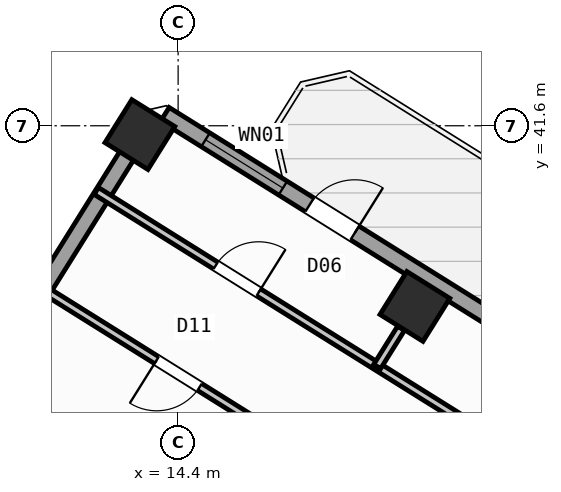
"""IFC4 building model, lengths in metres.
Left out: names, types, materials, properties, quantities, classifications, styles, units other than length and angle.
Written with IfcOpenShell. Run it as: python <this file> out.ifc"""

import sys

from ifc_helpers import new_model, si_unit, direction, frame, frame_2d, origin, origin_2d, place, context, subcontext, project, spatial, rectangle, hollow_rectangle, extrude, source, transform, mapped, element, fill, save


model = new_model("IFC4")
c1 = context("Model", 3, precision=1e-05, world=origin(), true_north=direction((0.0, 1.0)))
c2 = subcontext(c1, "Body", "Model", "MODEL_VIEW")
j1 = project(units=[si_unit("LENGTHUNIT", "METRE"), si_unit("PLANEANGLEUNIT", "RADIAN")], contexts=[c1])
p1 = place(None, origin())
s1 = spatial("IfcSite", under=j1, at=p1, CompositionType="ELEMENT")
p2 = place(p1, origin())
s2 = spatial("IfcBuilding", under=s1, at=p2, CompositionType="ELEMENT")
p3 = place(p2, frame((0.0, 0.0, 42.0)))
s3 = spatial("IfcBuildingStorey", under=s2, at=p3, CompositionType="ELEMENT", Elevation=42.0)
m1 = source(origin(), c2, "Body", "SweptSolid", [
    extrude(hollow_rectangle(XDim=1.0, YDim=1.0, WallThickness=0.04, at=origin_2d()), origin(), (0.0, 0.0, 1.0), 3.6),
])
for number, where, z_axis, x_axis in (
    (1, (19.073, 38.034, 0.0), (0.0, 0.0, 1.0), (-0.848, 0.53, 0.0)),
    (2, (13.646, 41.426, 0.0), (0.0, 0.0, 1.0), (-0.848, 0.53, 0.0)),
):
    element("IfcColumn", number, at=place(p3, frame(where, z_axis=z_axis, x_axis=x_axis)), inside=s3, PredefinedType="COLUMN", context=c2, shape_type="MappedRepresentation", body=[
        mapped(m1, transform((0.0, 0.0, 0.0), scale=1.0)),
    ])
p4 = place(p3, frame((2.415, 23.452, 0.0), z_axis=(0.0, 0.0, 1.0), x_axis=(0.52991049553, 0.848053575387, 0.0)))
e3 = element("IfcWall", 3, at=p4, inside=s3, PredefinedType="STANDARD", context=c2, shape_type="SweptSolid", body=[
    extrude(rectangle(XDim=21.587, YDim=0.32, at=frame_2d((10.794, 0.0))), origin(), (0.0, 0.0, 1.0), 2.725),
])
p5 = place(p4, frame((2.356, 0.0, 0.8)))
e4 = element("IfcOpeningElement", 4, at=p5, cuts=e3, PredefinedType="OPENING", context=c2, shape_type="SweptSolid", body=[
    extrude(rectangle(XDim=2.1, YDim=1.55, at=frame_2d((1.05, 0.775))), frame((0.0, 0.17, 0.0), z_axis=(0.0, -1.0, 0.0), x_axis=(1.0, 0.0, 0.0)), (0.0, 0.0, 1.0), 0.34),
])
p6 = place(p4, frame((9.344, 0.0, 0.85)))
e5 = element("IfcOpeningElement", 5, at=p6, cuts=e3, PredefinedType="OPENING", context=c2, shape_type="SweptSolid", body=[
    extrude(rectangle(XDim=1.8, YDim=1.5, at=frame_2d((0.9, 0.75))), frame((0.0, 0.17, 0.0), z_axis=(0.0, -1.0, 0.0), x_axis=(1.0, 0.0, 0.0)), (0.0, 0.0, 1.0), 0.34),
])
p7 = place(p4, frame((15.154, 0.0, 0.85)))
e6 = element("IfcOpeningElement", 6, at=p7, cuts=e3, PredefinedType="OPENING", context=c2, shape_type="SweptSolid", body=[
    extrude(rectangle(XDim=1.5, YDim=1.5, at=frame_2d((0.75, 0.75))), frame((0.0, 0.17, 0.0), z_axis=(0.0, -1.0, 0.0), x_axis=(1.0, 0.0, 0.0)), (0.0, 0.0, 1.0), 0.34),
])
p8 = place(p3, frame((14.138, 41.825, 0.0), z_axis=(0.0, 0.0, 1.0), x_axis=(0.848046498049, -0.529921821731, 0.0)))
e7 = element("IfcWall", 7, at=p8, inside=s3, PredefinedType="STANDARD", context=c2, shape_type="SweptSolid", body=[
    extrude(rectangle(XDim=31.588, YDim=0.32, at=frame_2d((15.794, 0.0))), origin(), (0.0, 0.0, 1.0), 3.35),
])
p9 = place(p8, frame((3.369, 0.0, 0.0)))
e8 = element("IfcOpeningElement", 8, at=p9, cuts=e7, PredefinedType="OPENING", context=c2, shape_type="SweptSolid", body=[
    extrude(rectangle(XDim=1.05, YDim=2.15, at=frame_2d((0.525, 1.075))), frame((0.0, 0.17, 0.0), z_axis=(0.0, -1.0, 0.0), x_axis=(1.0, 0.0, 0.0)), (0.0, 0.0, 1.0), 0.34),
])
p10 = place(p8, frame((0.946, 0.0, 0.85)))
e9 = element("IfcOpeningElement", 9, at=p10, cuts=e7, PredefinedType="OPENING", context=c2, shape_type="SweptSolid", body=[
    extrude(rectangle(XDim=1.8, YDim=1.5, at=frame_2d((0.9, 0.75))), frame((0.0, 0.17, 0.0), z_axis=(0.0, -1.0, 0.0), x_axis=(1.0, 0.0, 0.0)), (0.0, 0.0, 1.0), 0.34),
])
p11 = place(p8, frame((8.46, 0.0, 0.85)))
e10 = element("IfcOpeningElement", 10, at=p11, cuts=e7, PredefinedType="OPENING", context=c2, shape_type="SweptSolid", body=[
    extrude(rectangle(XDim=1.8, YDim=1.5, at=frame_2d((0.9, 0.75))), frame((0.0, 0.17, 0.0), z_axis=(0.0, -1.0, 0.0), x_axis=(1.0, 0.0, 0.0)), (0.0, 0.0, 1.0), 0.34),
])
p12 = place(p8, frame((13.899, 0.0, 0.85)))
e11 = element("IfcOpeningElement", 11, at=p12, cuts=e7, PredefinedType="OPENING", context=c2, shape_type="SweptSolid", body=[
    extrude(rectangle(XDim=1.5, YDim=1.5, at=frame_2d((0.75, 0.75))), frame((0.0, 0.17, 0.0), z_axis=(0.0, -1.0, 0.0), x_axis=(1.0, 0.0, 0.0)), (0.0, 0.0, 1.0), 0.34),
])
p13 = place(p8, frame((22.019, 0.0, 0.95)))
e12 = element("IfcOpeningElement", 12, at=p13, cuts=e7, PredefinedType="OPENING", context=c2, shape_type="SweptSolid", body=[
    extrude(rectangle(XDim=1.2, YDim=1.4, at=frame_2d((0.6, 0.7))), frame((0.0, 0.17, 0.0), z_axis=(0.0, -1.0, 0.0), x_axis=(1.0, 0.0, 0.0)), (0.0, 0.0, 1.0), 0.34),
])
p14 = place(p8, frame((27.569, 0.0, 0.95)))
e13 = element("IfcOpeningElement", 13, at=p14, cuts=e7, PredefinedType="OPENING", context=c2, shape_type="SweptSolid", body=[
    extrude(rectangle(XDim=1.2, YDim=1.4, at=frame_2d((0.6, 0.7))), frame((0.0, 0.17, 0.0), z_axis=(0.0, -1.0, 0.0), x_axis=(1.0, 0.0, 0.0)), (0.0, 0.0, 1.0), 0.34),
])
p15 = place(p3, frame((26.973, 31.447, 0.0), z_axis=(0.0, 0.0, 1.0), x_axis=(-0.848048310262, 0.529918921593, 0.0)))
e14 = element("IfcWall", 14, at=p15, inside=s3, PredefinedType="PARTITIONING", context=c2, shape_type="SweptSolid", body=[
    extrude(rectangle(XDim=16.73, YDim=0.16, at=frame_2d((8.365, 0.0))), origin(), (0.0, 0.0, 1.0), 3.34),
])
p16 = place(p15, frame((1.588, 0.0, 0.0)))
e15 = element("IfcOpeningElement", 15, at=p16, cuts=e14, PredefinedType="OPENING", context=c2, shape_type="SweptSolid", body=[
    extrude(rectangle(XDim=1.0, YDim=2.1, at=frame_2d((0.5, 1.05))), frame((0.0, 0.09, 0.0), z_axis=(0.0, -1.0, 0.0), x_axis=(1.0, 0.0, 0.0)), (0.0, 0.0, 1.0), 0.18),
])
p17 = place(p15, frame((6.685, 0.0, 0.0)))
e16 = element("IfcOpeningElement", 16, at=p17, cuts=e14, PredefinedType="OPENING", context=c2, shape_type="SweptSolid", body=[
    extrude(rectangle(XDim=1.0, YDim=2.1, at=frame_2d((0.5, 1.05))), frame((0.0, 0.09, 0.0), z_axis=(0.0, -1.0, 0.0), x_axis=(1.0, 0.0, 0.0)), (0.0, 0.0, 1.0), 0.18),
])
p18 = place(p15, frame((12.951, 0.0, 0.0)))
e17 = element("IfcOpeningElement", 17, at=p18, cuts=e14, PredefinedType="OPENING", context=c2, shape_type="SweptSolid", body=[
    extrude(rectangle(XDim=1.0, YDim=2.1, at=frame_2d((0.5, 1.05))), frame((0.0, 0.09, 0.0), z_axis=(0.0, -1.0, 0.0), x_axis=(1.0, 0.0, 0.0)), (0.0, 0.0, 1.0), 0.18),
])
p19 = place(p3, frame((25.807, 29.582, 0.0), z_axis=(0.0, 0.0, 1.0), x_axis=(-0.848052408131, 0.529912363569, 0.0)))
e18 = element("IfcWall", 18, at=p19, inside=s3, PredefinedType="PARTITIONING", context=c2, shape_type="SweptSolid", body=[
    extrude(rectangle(XDim=16.73, YDim=0.16, at=frame_2d((8.365, 0.0))), origin(), (0.0, 0.0, 1.0), 3.34),
])
p20 = place(p19, frame((2.22, 0.0, 0.0)))
e19 = element("IfcOpeningElement", 19, at=p20, cuts=e18, PredefinedType="OPENING", context=c2, shape_type="SweptSolid", body=[
    extrude(rectangle(XDim=0.86, YDim=2.05, at=frame_2d((0.43, 1.025))), frame((0.0, 0.09, 0.0), z_axis=(0.0, -1.0, 0.0), x_axis=(1.0, 0.0, 0.0)), (0.0, 0.0, 1.0), 0.18),
])
p21 = place(p19, frame((7.82, 0.0, 0.0)))
e20 = element("IfcOpeningElement", 20, at=p21, cuts=e18, PredefinedType="OPENING", context=c2, shape_type="SweptSolid", body=[
    extrude(rectangle(XDim=1.0, YDim=2.1, at=frame_2d((0.5, 1.05))), frame((0.0, 0.09, 0.0), z_axis=(0.0, -1.0, 0.0), x_axis=(1.0, 0.0, 0.0)), (0.0, 0.0, 1.0), 0.18),
])
p22 = place(p19, frame((12.95, 0.0, 0.0)))
e21 = element("IfcOpeningElement", 21, at=p22, cuts=e18, PredefinedType="OPENING", context=c2, shape_type="SweptSolid", body=[
    extrude(rectangle(XDim=1.0, YDim=2.1, at=frame_2d((0.5, 1.05))), frame((0.0, 0.09, 0.0), z_axis=(0.0, -1.0, 0.0), x_axis=(1.0, 0.0, 0.0)), (0.0, 0.0, 1.0), 0.18),
])
p23 = place(p3, frame((18.799, 37.602, 0.0), z_axis=(0.0, 0.0, 1.0), x_axis=(-0.529974231203, -0.848013746505, 0.0)))
e22 = element("IfcWall", 22, at=p23, inside=s3, PredefinedType="PARTITIONING", context=c2, shape_type="SweptSolid", body=[
    extrude(rectangle(XDim=0.888, YDim=0.16, at=frame_2d((0.444, 0.0))), origin(), (0.0, 0.0, 1.0), 2.725),
])
m2 = source(origin(), c2, "Body", "SweptSolid", [
    extrude(rectangle(XDim=1.05, YDim=2.15, at=frame_2d((0.525, 1.075))), frame((0.0, 0.025, 0.0), z_axis=(0.0, -1.0, 0.0), x_axis=(1.0, 0.0, 0.0)), (0.0, 0.0, 1.0), 0.05),
])
p24 = place(p9, origin())
e23 = element("IfcDoor", 23, at=p24, inside=s3, OperationType="SINGLE_SWING_RIGHT", PredefinedType="DOOR", context=c2, shape_type="MappedRepresentation", body=[
    mapped(m2, transform((0.0, 0.0, 0.0), scale=1.0)),
])
fill(e8, e23)
m3 = source(origin(), c2, "Body", "SweptSolid", [
    extrude(rectangle(XDim=1.8, YDim=1.5, at=frame_2d((0.9, 0.75))), frame((0.0, 0.03, 0.0), z_axis=(0.0, -1.0, 0.0), x_axis=(1.0, 0.0, 0.0)), (0.0, 0.0, 1.0), 0.06),
])
p25 = place(p10, origin())
e24 = element("IfcWindow", 24, at=p25, inside=s3, PartitioningType="SINGLE_PANEL", PredefinedType="WINDOW", context=c2, shape_type="MappedRepresentation", body=[
    mapped(m3, transform((0.0, 0.0, 0.0), scale=1.0)),
])
fill(e9, e24)
m4 = source(origin(), c2, "Body", "SweptSolid", [
    extrude(rectangle(XDim=1.0, YDim=2.1, at=frame_2d((0.5, 1.05))), frame((0.0, 0.025, 0.0), z_axis=(0.0, -1.0, 0.0), x_axis=(1.0, 0.0, 0.0)), (0.0, 0.0, 1.0), 0.05),
])
p26 = place(p22, origin())
e25 = element("IfcDoor", 25, at=p26, inside=s3, OperationType="SINGLE_SWING_RIGHT", PredefinedType="DOOR", context=c2, shape_type="MappedRepresentation", body=[
    mapped(m4, transform((0.0, 0.0, 0.0), scale=1.0)),
])
fill(e21, e25)
p27 = place(p18, frame((1.0, 0.0, 0.0), z_axis=(0.0, 0.0, 1.0), x_axis=(-1.0, 0.0, 0.0)))
e26 = element("IfcDoor", 26, at=p27, inside=s3, OperationType="SINGLE_SWING_RIGHT", PredefinedType="DOOR", context=c2, shape_type="MappedRepresentation", body=[
    mapped(m4, transform((0.0, 0.0, 0.0), scale=1.0)),
])
fill(e17, e26)
save(model, sys.argv[1])
